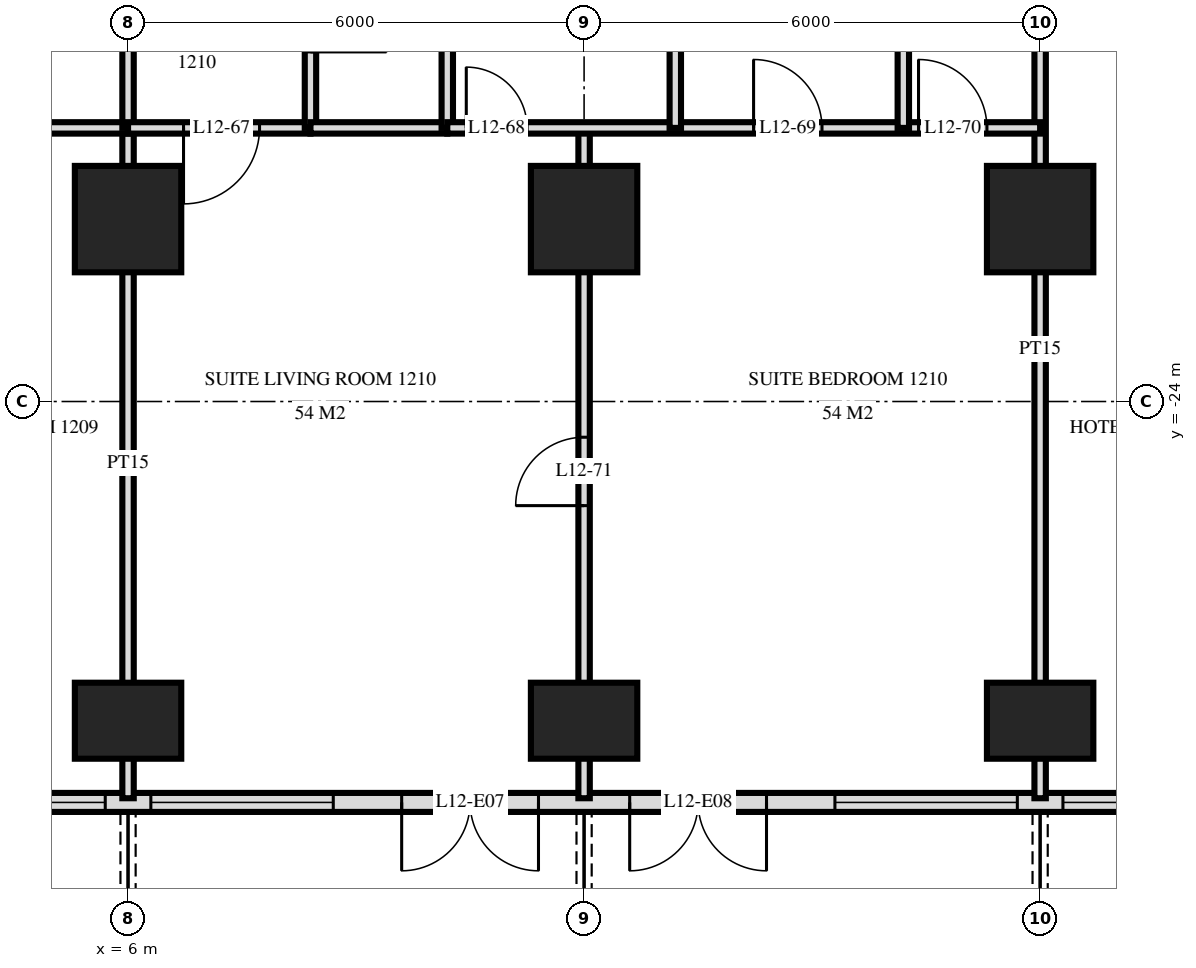
"""IFC4 building model, lengths in metres.
Left out: names, types, materials, properties, quantities, classifications, styles, units other than length and angle.
Written with IfcOpenShell. Run it as: python <this file> out.ifc"""

import sys

from ifc_helpers import new_model, si_unit, direction, frame, frame_2d, origin, origin_2d, place, context, subcontext, project, spatial, rectangle, extrude, element, fill, save


model = new_model("IFC4")
c1 = context("Model", 3, precision=1e-05, world=origin(), true_north=direction((0.0, 1.0)))
c2 = subcontext(c1, "Body", "Model", "MODEL_VIEW")
j1 = project(units=[si_unit("LENGTHUNIT", "METRE"), si_unit("PLANEANGLEUNIT", "RADIAN")], contexts=[c1])
p1 = place(None, origin())
s1 = spatial("IfcSite", under=j1, at=p1, CompositionType="ELEMENT")
p2 = place(p1, origin())
s2 = spatial("IfcBuilding", under=s1, at=p2, CompositionType="ELEMENT")
p3 = place(p2, frame((0.0, 0.0, 52.8)))
s3 = spatial("IfcBuildingStorey", under=s2, at=p3, CompositionType="ELEMENT", Elevation=52.8)
p4 = place(p3, frame((6.0, -28.2, 0.0), z_axis=(0.0, 0.0, 1.0), x_axis=(1.0, 0.0, 0.0)))
e1 = element("IfcColumn", 1, at=p4, inside=s3, PredefinedType="COLUMN", context=c2, shape_type="SweptSolid", body=[
    extrude(rectangle(XDim=1.4, YDim=1.0, at=origin_2d()), origin(), (0.0, 0.0, 1.0), 3.6),
])
p5 = place(p3, frame((6.0, -21.6, 0.0), z_axis=(0.0, 0.0, 1.0), x_axis=(1.0, 0.0, 0.0)))
e2 = element("IfcColumn", 2, at=p5, inside=s3, PredefinedType="COLUMN", context=c2, shape_type="SweptSolid", body=[
    extrude(rectangle(XDim=1.4, YDim=1.4, at=origin_2d()), origin(), (0.0, 0.0, 1.0), 3.6),
])
p6 = place(p3, frame((12.0, -28.2, 0.0), z_axis=(0.0, 0.0, 1.0), x_axis=(1.0, 0.0, 0.0)))
e3 = element("IfcColumn", 3, at=p6, inside=s3, PredefinedType="COLUMN", context=c2, shape_type="SweptSolid", body=[
    extrude(rectangle(XDim=1.4, YDim=1.0, at=origin_2d()), origin(), (0.0, 0.0, 1.0), 3.6),
])
p7 = place(p3, frame((12.0, -21.6, 0.0), z_axis=(0.0, 0.0, 1.0), x_axis=(1.0, 0.0, 0.0)))
e4 = element("IfcColumn", 4, at=p7, inside=s3, PredefinedType="COLUMN", context=c2, shape_type="SweptSolid", body=[
    extrude(rectangle(XDim=1.4, YDim=1.4, at=origin_2d()), origin(), (0.0, 0.0, 1.0), 3.6),
])
p8 = place(p3, frame((18.0, -28.2, 0.0), z_axis=(0.0, 0.0, 1.0), x_axis=(1.0, 0.0, 0.0)))
e5 = element("IfcColumn", 5, at=p8, inside=s3, PredefinedType="COLUMN", context=c2, shape_type="SweptSolid", body=[
    extrude(rectangle(XDim=1.4, YDim=1.0, at=origin_2d()), origin(), (0.0, 0.0, 1.0), 3.6),
])
p9 = place(p3, frame((18.0, -21.6, 0.0), z_axis=(0.0, 0.0, 1.0), x_axis=(1.0, 0.0, 0.0)))
e6 = element("IfcColumn", 6, at=p9, inside=s3, PredefinedType="COLUMN", context=c2, shape_type="SweptSolid", body=[
    extrude(rectangle(XDim=1.4, YDim=1.4, at=origin_2d()), origin(), (0.0, 0.0, 1.0), 3.6),
])
p10 = place(p3, frame((-28.775, -29.275, 0.0), z_axis=(0.0, 0.0, 1.0), x_axis=(1.0, 0.0, 0.0)))
e7 = element("IfcWall", 7, at=p10, inside=s3, PredefinedType="SOLIDWALL", context=c2, shape_type="SweptSolid", body=[
    extrude(rectangle(XDim=57.551, YDim=0.25, at=frame_2d((28.775, 0.0))), origin(), (0.0, 0.0, 1.0), 3.32),
])
p11 = place(p10, frame((0.575, 0.0, 0.0)))
e8 = element("IfcOpeningElement", 8, at=p11, cuts=e7, PredefinedType="OPENING", context=c2, shape_type="SweptSolid", body=[
    extrude(rectangle(XDim=1.8, YDim=2.4, at=frame_2d((0.9, 1.2))), frame((0.0, 0.135, 0.0), z_axis=(0.0, -1.0, 0.0), x_axis=(1.0, 0.0, 0.0)), (0.0, 0.0, 1.0), 0.27),
])
p12 = place(p10, frame((5.375, 0.0, 0.0)))
e9 = element("IfcOpeningElement", 9, at=p12, cuts=e7, PredefinedType="OPENING", context=c2, shape_type="SweptSolid", body=[
    extrude(rectangle(XDim=1.8, YDim=2.4, at=frame_2d((0.9, 1.2))), frame((0.0, 0.135, 0.0), z_axis=(0.0, -1.0, 0.0), x_axis=(1.0, 0.0, 0.0)), (0.0, 0.0, 1.0), 0.27),
])
p13 = place(p10, frame((8.075, 0.0, 0.3)))
e10 = element("IfcOpeningElement", 10, at=p13, cuts=e7, PredefinedType="OPENING", context=c2, shape_type="SweptSolid", body=[
    extrude(rectangle(XDim=2.4, YDim=2.1, at=frame_2d((1.2, 1.05))), frame((0.0, 0.135, 0.0), z_axis=(0.0, -1.0, 0.0), x_axis=(1.0, 0.0, 0.0)), (0.0, 0.0, 1.0), 0.27),
])
p14 = place(p10, frame((11.375, 0.0, 0.0)))
e11 = element("IfcOpeningElement", 11, at=p14, cuts=e7, PredefinedType="OPENING", context=c2, shape_type="SweptSolid", body=[
    extrude(rectangle(XDim=1.8, YDim=2.4, at=frame_2d((0.9, 1.2))), frame((0.0, 0.135, 0.0), z_axis=(0.0, -1.0, 0.0), x_axis=(1.0, 0.0, 0.0)), (0.0, 0.0, 1.0), 0.27),
])
p15 = place(p10, frame((14.075, 0.0, 0.3)))
e12 = element("IfcOpeningElement", 12, at=p15, cuts=e7, PredefinedType="OPENING", context=c2, shape_type="SweptSolid", body=[
    extrude(rectangle(XDim=2.4, YDim=2.1, at=frame_2d((1.2, 1.05))), frame((0.0, 0.135, 0.0), z_axis=(0.0, -1.0, 0.0), x_axis=(1.0, 0.0, 0.0)), (0.0, 0.0, 1.0), 0.27),
])
p16 = place(p10, frame((17.375, 0.0, 0.0)))
e13 = element("IfcOpeningElement", 13, at=p16, cuts=e7, PredefinedType="OPENING", context=c2, shape_type="SweptSolid", body=[
    extrude(rectangle(XDim=1.8, YDim=2.4, at=frame_2d((0.9, 1.2))), frame((0.0, 0.135, 0.0), z_axis=(0.0, -1.0, 0.0), x_axis=(1.0, 0.0, 0.0)), (0.0, 0.0, 1.0), 0.27),
])
p17 = place(p10, frame((20.075, 0.0, 0.3)))
e14 = element("IfcOpeningElement", 14, at=p17, cuts=e7, PredefinedType="OPENING", context=c2, shape_type="SweptSolid", body=[
    extrude(rectangle(XDim=2.4, YDim=2.1, at=frame_2d((1.2, 1.05))), frame((0.0, 0.135, 0.0), z_axis=(0.0, -1.0, 0.0), x_axis=(1.0, 0.0, 0.0)), (0.0, 0.0, 1.0), 0.27),
])
p18 = place(p10, frame((23.075, 0.0, 0.3)))
e15 = element("IfcOpeningElement", 15, at=p18, cuts=e7, PredefinedType="OPENING", context=c2, shape_type="SweptSolid", body=[
    extrude(rectangle(XDim=2.4, YDim=2.1, at=frame_2d((1.2, 1.05))), frame((0.0, 0.135, 0.0), z_axis=(0.0, -1.0, 0.0), x_axis=(1.0, 0.0, 0.0)), (0.0, 0.0, 1.0), 0.27),
])
p19 = place(p10, frame((26.375, 0.0, 0.0)))
e16 = element("IfcOpeningElement", 16, at=p19, cuts=e7, PredefinedType="OPENING", context=c2, shape_type="SweptSolid", body=[
    extrude(rectangle(XDim=1.8, YDim=2.4, at=frame_2d((0.9, 1.2))), frame((0.0, 0.135, 0.0), z_axis=(0.0, -1.0, 0.0), x_axis=(1.0, 0.0, 0.0)), (0.0, 0.0, 1.0), 0.27),
])
p20 = place(p10, frame((29.375, 0.0, 0.0)))
e17 = element("IfcOpeningElement", 17, at=p20, cuts=e7, PredefinedType="OPENING", context=c2, shape_type="SweptSolid", body=[
    extrude(rectangle(XDim=1.8, YDim=2.4, at=frame_2d((0.9, 1.2))), frame((0.0, 0.135, 0.0), z_axis=(0.0, -1.0, 0.0), x_axis=(1.0, 0.0, 0.0)), (0.0, 0.0, 1.0), 0.27),
])
p21 = place(p10, frame((32.075, 0.0, 0.3)))
e18 = element("IfcOpeningElement", 18, at=p21, cuts=e7, PredefinedType="OPENING", context=c2, shape_type="SweptSolid", body=[
    extrude(rectangle(XDim=2.4, YDim=2.1, at=frame_2d((1.2, 1.05))), frame((0.0, 0.135, 0.0), z_axis=(0.0, -1.0, 0.0), x_axis=(1.0, 0.0, 0.0)), (0.0, 0.0, 1.0), 0.27),
])
p22 = place(p10, frame((35.075, 0.0, 0.3)))
e19 = element("IfcOpeningElement", 19, at=p22, cuts=e7, PredefinedType="OPENING", context=c2, shape_type="SweptSolid", body=[
    extrude(rectangle(XDim=2.4, YDim=2.1, at=frame_2d((1.2, 1.05))), frame((0.0, 0.135, 0.0), z_axis=(0.0, -1.0, 0.0), x_axis=(1.0, 0.0, 0.0)), (0.0, 0.0, 1.0), 0.27),
])
p23 = place(p10, frame((38.375, 0.0, 0.0)))
e20 = element("IfcOpeningElement", 20, at=p23, cuts=e7, PredefinedType="OPENING", context=c2, shape_type="SweptSolid", body=[
    extrude(rectangle(XDim=1.8, YDim=2.4, at=frame_2d((0.9, 1.2))), frame((0.0, 0.135, 0.0), z_axis=(0.0, -1.0, 0.0), x_axis=(1.0, 0.0, 0.0)), (0.0, 0.0, 1.0), 0.27),
])
p24 = place(p10, frame((41.375, 0.0, 0.0)))
e21 = element("IfcOpeningElement", 21, at=p24, cuts=e7, PredefinedType="OPENING", context=c2, shape_type="SweptSolid", body=[
    extrude(rectangle(XDim=1.8, YDim=2.4, at=frame_2d((0.9, 1.2))), frame((0.0, 0.135, 0.0), z_axis=(0.0, -1.0, 0.0), x_axis=(1.0, 0.0, 0.0)), (0.0, 0.0, 1.0), 0.27),
])
p25 = place(p10, frame((44.075, 0.0, 0.3)))
e22 = element("IfcOpeningElement", 22, at=p25, cuts=e7, PredefinedType="OPENING", context=c2, shape_type="SweptSolid", body=[
    extrude(rectangle(XDim=2.4, YDim=2.1, at=frame_2d((1.2, 1.05))), frame((0.0, 0.135, 0.0), z_axis=(0.0, -1.0, 0.0), x_axis=(1.0, 0.0, 0.0)), (0.0, 0.0, 1.0), 0.27),
])
p26 = place(p10, frame((47.075, 0.0, 0.3)))
e23 = element("IfcOpeningElement", 23, at=p26, cuts=e7, PredefinedType="OPENING", context=c2, shape_type="SweptSolid", body=[
    extrude(rectangle(XDim=2.4, YDim=2.1, at=frame_2d((1.2, 1.05))), frame((0.0, 0.135, 0.0), z_axis=(0.0, -1.0, 0.0), x_axis=(1.0, 0.0, 0.0)), (0.0, 0.0, 1.0), 0.27),
])
p27 = place(p10, frame((50.375, 0.0, 0.0)))
e24 = element("IfcOpeningElement", 24, at=p27, cuts=e7, PredefinedType="OPENING", context=c2, shape_type="SweptSolid", body=[
    extrude(rectangle(XDim=1.8, YDim=2.4, at=frame_2d((0.9, 1.2))), frame((0.0, 0.135, 0.0), z_axis=(0.0, -1.0, 0.0), x_axis=(1.0, 0.0, 0.0)), (0.0, 0.0, 1.0), 0.27),
])
p28 = place(p10, frame((53.375, 0.0, 0.0)))
e25 = element("IfcOpeningElement", 25, at=p28, cuts=e7, PredefinedType="OPENING", context=c2, shape_type="SweptSolid", body=[
    extrude(rectangle(XDim=1.8, YDim=2.4, at=frame_2d((0.9, 1.2))), frame((0.0, 0.135, 0.0), z_axis=(0.0, -1.0, 0.0), x_axis=(1.0, 0.0, 0.0)), (0.0, 0.0, 1.0), 0.27),
])
p29 = place(p3, frame((18.0, -29.22, 0.0), z_axis=(0.0, 0.0, 1.0), x_axis=(0.0, 1.0, 0.0)))
e26 = element("IfcWall", 26, at=p29, inside=s3, PredefinedType="PARTITIONING", context=c2, shape_type="SweptSolid", body=[
    extrude(rectangle(XDim=11.82, YDim=0.15, at=frame_2d((5.91, 0.0))), origin(), (0.0, 0.0, 1.0), 3.32),
])
for number, where, z_axis, x_axis in (
    (27, (16.2, -20.4, 0.0), (0.0, 0.0, 1.0), (0.0, 1.0, 0.0)),
    (28, (13.2, -20.4, 0.0), (0.0, 0.0, 1.0), (0.0, 1.0, 0.0)),
):
    element("IfcWall", number, at=place(p3, frame(where, z_axis=z_axis, x_axis=x_axis)), inside=s3, PredefinedType="PARTITIONING", context=c2, shape_type="SweptSolid", body=[
        extrude(rectangle(XDim=3.0, YDim=0.15, at=frame_2d((1.5, 0.0))), origin(), (0.0, 0.0, 1.0), 3.32),
    ])
p30 = place(p3, frame((12.0, -29.22, 0.0), z_axis=(0.0, 0.0, 1.0), x_axis=(0.0, 1.0, 0.0)))
e29 = element("IfcWall", 29, at=p30, inside=s3, PredefinedType="PARTITIONING", context=c2, shape_type="SweptSolid", body=[
    extrude(rectangle(XDim=8.82, YDim=0.15, at=frame_2d((4.41, 0.0))), origin(), (0.0, 0.0, 1.0), 3.32),
])
p31 = place(p30, frame((3.85, 0.0, 0.0)))
e30 = element("IfcOpeningElement", 30, at=p31, cuts=e29, PredefinedType="OPENING", context=c2, shape_type="SweptSolid", body=[
    extrude(rectangle(XDim=0.9, YDim=2.1, at=frame_2d((0.45, 1.05))), frame((0.0, 0.085, 0.0), z_axis=(0.0, -1.0, 0.0), x_axis=(1.0, 0.0, 0.0)), (0.0, 0.0, 1.0), 0.17),
])
p32 = place(p3, frame((10.2, -20.4, 0.0), z_axis=(0.0, 0.0, 1.0), x_axis=(0.0, 1.0, 0.0)))
e31 = element("IfcWall", 31, at=p32, inside=s3, PredefinedType="PLUMBINGWALL", context=c2, shape_type="SweptSolid", body=[
    extrude(rectangle(XDim=3.0, YDim=0.15, at=frame_2d((1.5, 0.0))), origin(), (0.0, 0.0, 1.0), 3.32),
])
p33 = place(p3, frame((8.4, -20.4, 0.0), z_axis=(0.0, 0.0, 1.0), x_axis=(0.0, 1.0, 0.0)))
e32 = element("IfcWall", 32, at=p33, inside=s3, PredefinedType="PARTITIONING", context=c2, shape_type="SweptSolid", body=[
    extrude(rectangle(XDim=3.0, YDim=0.15, at=frame_2d((1.5, 0.0))), origin(), (0.0, 0.0, 1.0), 3.32),
])
p34 = place(p33, frame((1.0, 0.0, 0.0)))
e33 = element("IfcOpeningElement", 33, at=p34, cuts=e32, PredefinedType="OPENING", context=c2, shape_type="SweptSolid", body=[
    extrude(rectangle(XDim=1.0, YDim=2.1, at=frame_2d((0.5, 1.05))), frame((0.0, 0.085, 0.0), z_axis=(0.0, -1.0, 0.0), x_axis=(1.0, 0.0, 0.0)), (0.0, 0.0, 1.0), 0.17),
])
p35 = place(p3, frame((6.0, -20.4, 0.0), z_axis=(0.0, 0.0, 1.0), x_axis=(0.0, 1.0, 0.0)))
e34 = element("IfcWall", 34, at=p35, inside=s3, PredefinedType="PARTITIONING", context=c2, shape_type="SweptSolid", body=[
    extrude(rectangle(XDim=3.0, YDim=0.15, at=frame_2d((1.5, 0.0))), origin(), (0.0, 0.0, 1.0), 3.32),
])
p36 = place(p3, frame((6.0, -29.22, 0.0), z_axis=(0.0, 0.0, 1.0), x_axis=(0.0, 1.0, 0.0)))
e35 = element("IfcWall", 35, at=p36, inside=s3, PredefinedType="PARTITIONING", context=c2, shape_type="SweptSolid", body=[
    extrude(rectangle(XDim=8.82, YDim=0.15, at=frame_2d((4.41, 0.0))), origin(), (0.0, 0.0, 1.0), 3.32),
])
p37 = place(p3, frame((6.0, -20.4, 0.0), z_axis=(0.0, 0.0, 1.0), x_axis=(1.0, 0.0, 0.0)))
e36 = element("IfcWall", 36, at=p37, inside=s3, PredefinedType="PARTITIONING", context=c2, shape_type="SweptSolid", body=[
    extrude(rectangle(XDim=2.4, YDim=0.15, at=frame_2d((1.2, 0.0))), origin(), (0.0, 0.0, 1.0), 3.32),
])
p38 = place(p37, frame((0.73, 0.0, 0.0)))
e37 = element("IfcOpeningElement", 37, at=p38, cuts=e36, PredefinedType="OPENING", context=c2, shape_type="SweptSolid", body=[
    extrude(rectangle(XDim=1.0, YDim=2.1, at=frame_2d((0.5, 1.05))), frame((0.0, 0.085, 0.0), z_axis=(0.0, -1.0, 0.0), x_axis=(1.0, 0.0, 0.0)), (0.0, 0.0, 1.0), 0.17),
])
p39 = place(p3, frame((4.3, -20.4, 0.0), z_axis=(0.0, 0.0, 1.0), x_axis=(1.0, 0.0, 0.0)))
e38 = element("IfcWall", 38, at=p39, inside=s3, PredefinedType="PARTITIONING", context=c2, shape_type="SweptSolid", body=[
    extrude(rectangle(XDim=1.7, YDim=0.15, at=frame_2d((0.85, 0.0))), origin(), (0.0, 0.0, 1.0), 3.32),
])
p40 = place(p3, frame((10.2, -20.4, 0.0), z_axis=(0.0, 0.0, 1.0), x_axis=(1.0, 0.0, 0.0)))
e39 = element("IfcWall", 39, at=p40, inside=s3, PredefinedType="PARTITIONING", context=c2, shape_type="SweptSolid", body=[
    extrude(rectangle(XDim=7.8, YDim=0.15, at=frame_2d((3.9, 0.0))), origin(), (0.0, 0.0, 1.0), 3.32),
])
p41 = place(p40, frame((0.25, 0.0, 0.0)))
e40 = element("IfcOpeningElement", 40, at=p41, cuts=e39, PredefinedType="OPENING", context=c2, shape_type="SweptSolid", body=[
    extrude(rectangle(XDim=0.8, YDim=2.1, at=frame_2d((0.4, 1.05))), frame((0.0, 0.085, 0.0), z_axis=(0.0, -1.0, 0.0), x_axis=(1.0, 0.0, 0.0)), (0.0, 0.0, 1.0), 0.17),
])
p42 = place(p40, frame((4.03, 0.0, 0.0)))
e41 = element("IfcOpeningElement", 41, at=p42, cuts=e39, PredefinedType="OPENING", context=c2, shape_type="SweptSolid", body=[
    extrude(rectangle(XDim=0.9, YDim=2.1, at=frame_2d((0.45, 1.05))), frame((0.0, 0.085, 0.0), z_axis=(0.0, -1.0, 0.0), x_axis=(1.0, 0.0, 0.0)), (0.0, 0.0, 1.0), 0.17),
])
p43 = place(p40, frame((6.2, 0.0, 0.0)))
e42 = element("IfcOpeningElement", 42, at=p43, cuts=e39, PredefinedType="OPENING", context=c2, shape_type="SweptSolid", body=[
    extrude(rectangle(XDim=0.9, YDim=2.1, at=frame_2d((0.45, 1.05))), frame((0.0, 0.085, 0.0), z_axis=(0.0, -1.0, 0.0), x_axis=(1.0, 0.0, 0.0)), (0.0, 0.0, 1.0), 0.17),
])
p44 = place(p3, frame((8.4, -20.4, 0.0), z_axis=(0.0, 0.0, 1.0), x_axis=(1.0, 0.0, 0.0)))
e43 = element("IfcWall", 43, at=p44, inside=s3, PredefinedType="PLUMBINGWALL", context=c2, shape_type="SweptSolid", body=[
    extrude(rectangle(XDim=1.8, YDim=0.15, at=frame_2d((0.9, 0.0))), origin(), (0.0, 0.0, 1.0), 3.32),
])
p45 = place(p21, origin())
e44 = element("IfcWindow", 44, at=p45, inside=s3, PartitioningType="SINGLE_PANEL", PredefinedType="WINDOW", context=c2, shape_type="SweptSolid", body=[
    extrude(rectangle(XDim=2.4, YDim=2.1, at=frame_2d((1.2, 1.05))), frame((0.0, 0.03, 0.0), z_axis=(0.0, -1.0, 0.0), x_axis=(1.0, 0.0, 0.0)), (0.0, 0.0, 1.0), 0.06),
])
fill(e18, e44)
p46 = place(p22, origin())
e45 = element("IfcWindow", 45, at=p46, inside=s3, PartitioningType="SINGLE_PANEL", PredefinedType="WINDOW", context=c2, shape_type="SweptSolid", body=[
    extrude(rectangle(XDim=2.4, YDim=2.1, at=frame_2d((1.2, 1.05))), frame((0.0, 0.03, 0.0), z_axis=(0.0, -1.0, 0.0), x_axis=(1.0, 0.0, 0.0)), (0.0, 0.0, 1.0), 0.06),
])
fill(e19, e45)
p47 = place(p23, frame((0.9, 0.0, 0.0), z_axis=(0.0, 0.0, 1.0), x_axis=(-1.0, 0.0, 0.0)))
e46 = element("IfcDoor", 46, at=p47, inside=s3, OperationType="DOUBLE_DOOR_SINGLE_SWING", PredefinedType="DOOR", context=c2, shape_type="SweptSolid", body=[
    extrude(rectangle(XDim=1.8, YDim=2.4, at=frame_2d((0.0, 1.2))), frame((0.0, -0.025, 0.0), z_axis=(0.0, 1.0, 0.0), x_axis=(-1.0, 0.0, 0.0)), (0.0, 0.0, 1.0), 0.05),
])
fill(e20, e46)
p48 = place(p24, frame((0.9, 0.0, 0.0), z_axis=(0.0, 0.0, 1.0), x_axis=(-1.0, 0.0, 0.0)))
e47 = element("IfcDoor", 47, at=p48, inside=s3, OperationType="DOUBLE_DOOR_SINGLE_SWING", PredefinedType="DOOR", context=c2, shape_type="SweptSolid", body=[
    extrude(rectangle(XDim=1.8, YDim=2.4, at=frame_2d((0.0, 1.2))), frame((0.0, -0.025, 0.0), z_axis=(0.0, 1.0, 0.0), x_axis=(-1.0, 0.0, 0.0)), (0.0, 0.0, 1.0), 0.05),
])
fill(e21, e47)
p49 = place(p25, origin())
e48 = element("IfcWindow", 48, at=p49, inside=s3, PartitioningType="SINGLE_PANEL", PredefinedType="WINDOW", context=c2, shape_type="SweptSolid", body=[
    extrude(rectangle(XDim=2.4, YDim=2.1, at=frame_2d((1.2, 1.05))), frame((0.0, 0.03, 0.0), z_axis=(0.0, -1.0, 0.0), x_axis=(1.0, 0.0, 0.0)), (0.0, 0.0, 1.0), 0.06),
])
fill(e22, e48)
p50 = place(p26, origin())
e49 = element("IfcWindow", 49, at=p50, inside=s3, PartitioningType="SINGLE_PANEL", PredefinedType="WINDOW", context=c2, shape_type="SweptSolid", body=[
    extrude(rectangle(XDim=2.4, YDim=2.1, at=frame_2d((1.2, 1.05))), frame((0.0, 0.03, 0.0), z_axis=(0.0, -1.0, 0.0), x_axis=(1.0, 0.0, 0.0)), (0.0, 0.0, 1.0), 0.06),
])
fill(e23, e49)
p51 = place(p38, frame((0.5, 0.0, 0.0), z_axis=(0.0, 0.0, 1.0), x_axis=(-1.0, 0.0, 0.0)))
e50 = element("IfcDoor", 50, at=p51, inside=s3, OperationType="SINGLE_SWING_LEFT", PredefinedType="DOOR", context=c2, shape_type="SweptSolid", body=[
    extrude(rectangle(XDim=1.0, YDim=2.1, at=frame_2d((0.0, 1.05))), frame((0.0, -0.025, 0.0), z_axis=(0.0, 1.0, 0.0), x_axis=(-1.0, 0.0, 0.0)), (0.0, 0.0, 1.0), 0.05),
])
fill(e37, e50)
p52 = place(p41, origin())
e51 = element("IfcDoor", 51, at=p52, inside=s3, OperationType="SINGLE_SWING_RIGHT", PredefinedType="DOOR", context=c2, shape_type="SweptSolid", body=[
    extrude(rectangle(XDim=0.8, YDim=2.1, at=frame_2d((0.4, 1.05))), frame((0.0, 0.025, 0.0), z_axis=(0.0, -1.0, 0.0), x_axis=(1.0, 0.0, 0.0)), (0.0, 0.0, 1.0), 0.05),
])
fill(e40, e51)
p53 = place(p42, origin())
e52 = element("IfcDoor", 52, at=p53, inside=s3, OperationType="SINGLE_SWING_RIGHT", PredefinedType="DOOR", context=c2, shape_type="SweptSolid", body=[
    extrude(rectangle(XDim=0.9, YDim=2.1, at=frame_2d((0.45, 1.05))), frame((0.0, 0.025, 0.0), z_axis=(0.0, -1.0, 0.0), x_axis=(1.0, 0.0, 0.0)), (0.0, 0.0, 1.0), 0.05),
])
fill(e41, e52)
p54 = place(p43, origin())
e53 = element("IfcDoor", 53, at=p54, inside=s3, OperationType="SINGLE_SWING_RIGHT", PredefinedType="DOOR", context=c2, shape_type="SweptSolid", body=[
    extrude(rectangle(XDim=0.9, YDim=2.1, at=frame_2d((0.45, 1.05))), frame((0.0, 0.025, 0.0), z_axis=(0.0, -1.0, 0.0), x_axis=(1.0, 0.0, 0.0)), (0.0, 0.0, 1.0), 0.05),
])
fill(e42, e53)
p55 = place(p31, origin())
e54 = element("IfcDoor", 54, at=p55, inside=s3, OperationType="SINGLE_SWING_RIGHT", PredefinedType="DOOR", context=c2, shape_type="SweptSolid", body=[
    extrude(rectangle(XDim=0.9, YDim=2.1, at=frame_2d((0.45, 1.05))), frame((0.0, 0.025, 0.0), z_axis=(0.0, -1.0, 0.0), x_axis=(1.0, 0.0, 0.0)), (0.0, 0.0, 1.0), 0.05),
])
fill(e30, e54)
save(model, sys.argv[1])
